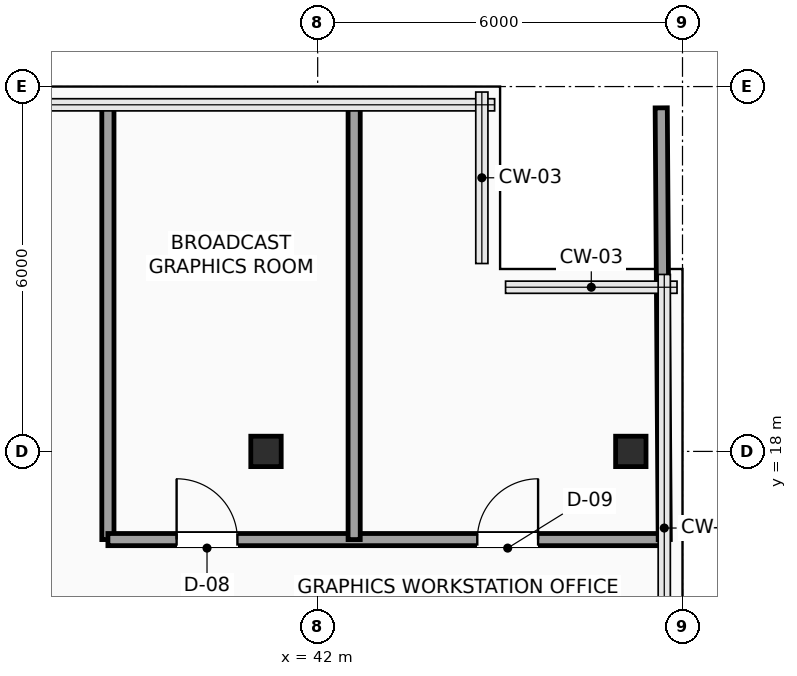
"""IFC4 building model, lengths in metres.
Left out: names, types, materials, properties, quantities, classifications, styles, units other than length and angle.
Written with IfcOpenShell. Run it as: python <this file> out.ifc"""

import sys

from ifc_helpers import new_model, si_unit, direction, frame, frame_2d, origin, origin_2d, place, context, subcontext, project, spatial, rectangle, hollow_rectangle, extrude, element, fill, save


model = new_model("IFC4")
c1 = context("Model", 3, precision=1e-05, world=origin(), true_north=direction((0.0, 1.0)))
c2 = subcontext(c1, "Body", "Model", "MODEL_VIEW")
j1 = project(units=[si_unit("LENGTHUNIT", "METRE"), si_unit("PLANEANGLEUNIT", "RADIAN")], contexts=[c1])
p1 = place(None, origin())
s1 = spatial("IfcSite", under=j1, at=p1, CompositionType="ELEMENT")
p2 = place(p1, origin())
s2 = spatial("IfcBuilding", under=s1, at=p2, CompositionType="ELEMENT")
p3 = place(p2, frame((0.0, 0.0, 115.65)))
s3 = spatial("IfcBuildingStorey", under=s2, at=p3, CompositionType="ELEMENT", Elevation=115.65)
for number, where, z_axis, x_axis in (
    (1, (41.15, 18.0, 0.0), (0.0, 0.0, 1.0), (1.0, 0.0, 0.0)),
    (2, (47.15, 18.0, 0.0), (0.0, 0.0, 1.0), (1.0, 0.0, 0.0)),
):
    element("IfcColumn", number, at=place(p3, frame(where, z_axis=z_axis, x_axis=x_axis)), inside=s3, PredefinedType="COLUMN", context=c2, shape_type="SweptSolid", body=[
        extrude(hollow_rectangle(XDim=0.5, YDim=0.5, WallThickness=0.025, InnerFilletRadius=0.025, OuterFilletRadius=0.04, at=origin_2d()), origin(), (0.0, 0.0, 1.0), 3.75),
    ])
p4 = place(p3, frame((38.55, 23.7, 0.0), z_axis=(0.0, 0.0, 1.0), x_axis=(0.0, -1.0, 0.0)))
e3 = element("IfcWall", 3, at=p4, inside=s3, PredefinedType="SOLIDWALL", context=c2, shape_type="SweptSolid", body=[
    extrude(rectangle(XDim=7.15, YDim=0.2, at=frame_2d((3.575, 0.0))), origin(), (0.0, 0.0, 1.0), 3.525),
])
p5 = place(p3, frame((38.55, 16.55, 0.0), z_axis=(0.0, 0.0, 1.0), x_axis=(1.0, 0.0, 0.0)))
e4 = element("IfcWall", 4, at=p5, inside=s3, PredefinedType="SOLIDWALL", context=c2, shape_type="SweptSolid", body=[
    extrude(rectangle(XDim=9.15, YDim=0.2, at=frame_2d((4.575, 0.0))), origin(), (0.0, 0.0, 1.0), 3.525),
])
p6 = place(p5, frame((1.13, 0.0, 0.0)))
e5 = element("IfcOpeningElement", 5, at=p6, cuts=e4, PredefinedType="OPENING", context=c2, shape_type="SweptSolid", body=[
    extrude(rectangle(XDim=1.0, YDim=2.2, at=frame_2d((0.5, 1.1))), frame((0.0, 0.11, 0.0), z_axis=(0.0, -1.0, 0.0), x_axis=(1.0, 0.0, 0.0)), (0.0, 0.0, 1.0), 0.22),
])
p7 = place(p5, frame((6.075, 0.0, 0.0)))
e6 = element("IfcOpeningElement", 6, at=p7, cuts=e4, PredefinedType="OPENING", context=c2, shape_type="SweptSolid", body=[
    extrude(rectangle(XDim=1.0, YDim=2.2, at=frame_2d((0.5, 1.1))), frame((0.0, 0.11, 0.0), z_axis=(0.0, -1.0, 0.0), x_axis=(1.0, 0.0, 0.0)), (0.0, 0.0, 1.0), 0.22),
])
p8 = place(p3, frame((42.6, 16.55, 0.0), z_axis=(0.0, 0.0, 1.0), x_axis=(0.0, 1.0, 0.0)))
e7 = element("IfcWall", 7, at=p8, inside=s3, PredefinedType="PARTITIONING", context=c2, shape_type="SweptSolid", body=[
    extrude(rectangle(XDim=7.15, YDim=0.2, at=frame_2d((3.575, 0.0))), origin(), (0.0, 0.0, 1.0), 3.525),
])
p9 = place(p3, frame((47.7, 16.55, 0.0), z_axis=(0.0, 0.0, 1.0), x_axis=(-0.007049101019, 0.999975154779, 0.0)))
e8 = element("IfcWall", 8, at=p9, inside=s3, PredefinedType="PARTITIONING", context=c2, shape_type="SweptSolid", body=[
    extrude(rectangle(XDim=7.1, YDim=0.2, at=frame_2d((3.55, 0.0))), origin(), (0.0, 0.0, 1.0), 3.525),
])
p10 = place(p6, origin())
e9 = element("IfcDoor", 9, at=p10, inside=s3, OperationType="SINGLE_SWING_LEFT", PredefinedType="DOOR", context=c2, shape_type="SweptSolid", body=[
    extrude(rectangle(XDim=1.0, YDim=2.2, at=frame_2d((0.5, 1.1))), frame((0.0, 0.025, 0.0), z_axis=(0.0, -1.0, 0.0), x_axis=(1.0, 0.0, 0.0)), (0.0, 0.0, 1.0), 0.05),
])
fill(e5, e9)
p11 = place(p7, origin())
e10 = element("IfcDoor", 10, at=p11, inside=s3, OperationType="SINGLE_SWING_RIGHT", PredefinedType="DOOR", context=c2, shape_type="SweptSolid", body=[
    extrude(rectangle(XDim=1.0, YDim=2.2, at=frame_2d((0.5, 1.1))), frame((0.0, 0.025, 0.0), z_axis=(0.0, -1.0, 0.0), x_axis=(1.0, 0.0, 0.0)), (0.0, 0.0, 1.0), 0.05),
])
fill(e6, e10)
save(model, sys.argv[1])
